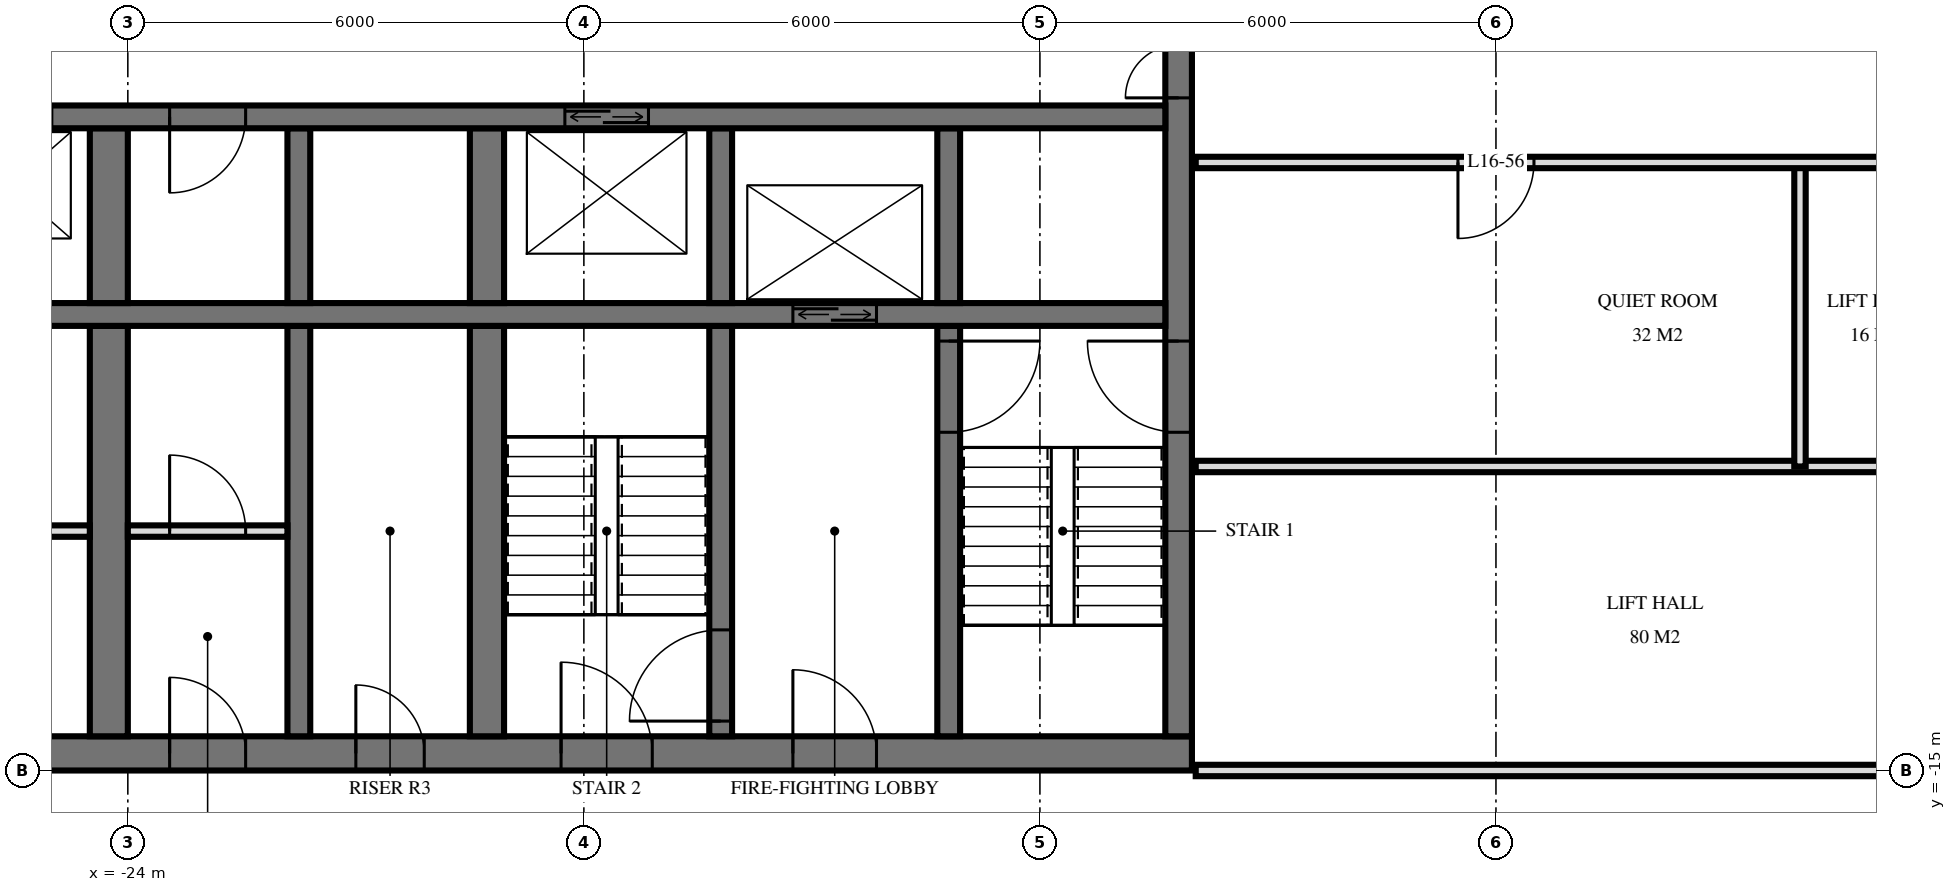
"""IFC4 building model, lengths in metres.
Left out: names, types, materials, properties, quantities, classifications, styles, units other than length and angle.
Written with IfcOpenShell. Run it as: python <this file> out.ifc"""

import sys

from ifc_helpers import new_model, si_unit, direction, frame, frame_2d, origin, place, context, subcontext, project, spatial, rectangle, extrude, element, fill, save


model = new_model("IFC4")
c1 = context("Model", 3, precision=1e-05, world=origin(), true_north=direction((0.0, 1.0)))
c2 = subcontext(c1, "Body", "Model", "MODEL_VIEW")
j1 = project(units=[si_unit("LENGTHUNIT", "METRE"), si_unit("PLANEANGLEUNIT", "RADIAN")], contexts=[c1])
p1 = place(None, origin())
s1 = spatial("IfcSite", under=j1, at=p1, CompositionType="ELEMENT")
p2 = place(p1, origin())
s2 = spatial("IfcBuilding", under=s1, at=p2, CompositionType="ELEMENT")
p3 = place(p2, frame((0.0, 0.0, 67.2)))
s3 = spatial("IfcBuildingStorey", under=s2, at=p3, CompositionType="ELEMENT", Elevation=67.2)
p4 = place(p3, frame((-29.5, -14.775, 0.0), z_axis=(0.0, 0.0, 1.0), x_axis=(1.0, 0.0, 0.0)))
e1 = element("IfcWall", 1, at=p4, inside=s3, PredefinedType="SHEAR", context=c2, shape_type="SweptSolid", body=[
    extrude(rectangle(XDim=19.5, YDim=0.45, at=frame_2d((9.75, 0.0))), origin(), (0.0, 0.0, 1.0), 3.6),
])
p5 = place(p4, frame((11.2, 0.0, 0.0)))
e2 = element("IfcOpeningElement", 2, at=p5, cuts=e1, PredefinedType="OPENING", context=c2, shape_type="SweptSolid", body=[
    extrude(rectangle(XDim=1.2, YDim=2.1, at=frame_2d((0.6, 1.05))), frame((0.0, 0.235, 0.0), z_axis=(0.0, -1.0, 0.0), x_axis=(1.0, 0.0, 0.0)), (0.0, 0.0, 1.0), 0.47),
])
p6 = place(p4, frame((14.25, 0.0, 0.0)))
e3 = element("IfcOpeningElement", 3, at=p6, cuts=e1, PredefinedType="OPENING", context=c2, shape_type="SweptSolid", body=[
    extrude(rectangle(XDim=1.1, YDim=2.1, at=frame_2d((0.55, 1.05))), frame((0.0, 0.235, 0.0), z_axis=(0.0, -1.0, 0.0), x_axis=(1.0, 0.0, 0.0)), (0.0, 0.0, 1.0), 0.47),
])
p7 = place(p4, frame((8.5, 0.0, 0.0)))
e4 = element("IfcOpeningElement", 4, at=p7, cuts=e1, PredefinedType="OPENING", context=c2, shape_type="SweptSolid", body=[
    extrude(rectangle(XDim=0.9, YDim=2.1, at=frame_2d((0.45, 1.05))), frame((0.0, 0.235, 0.0), z_axis=(0.0, -1.0, 0.0), x_axis=(1.0, 0.0, 0.0)), (0.0, 0.0, 1.0), 0.47),
])
p8 = place(p4, frame((6.05, 0.0, 0.0)))
e5 = element("IfcOpeningElement", 5, at=p8, cuts=e1, PredefinedType="OPENING", context=c2, shape_type="SweptSolid", body=[
    extrude(rectangle(XDim=1.0, YDim=2.1, at=frame_2d((0.5, 1.05))), frame((0.0, 0.235, 0.0), z_axis=(0.0, -1.0, 0.0), x_axis=(1.0, 0.0, 0.0)), (0.0, 0.0, 1.0), 0.47),
])
p9 = place(p4, frame((2.25, 0.0, 0.0)))
e6 = element("IfcOpeningElement", 6, at=p9, cuts=e1, PredefinedType="OPENING", context=c2, shape_type="SweptSolid", body=[
    extrude(rectangle(XDim=1.0, YDim=2.1, at=frame_2d((0.5, 1.05))), frame((0.0, 0.235, 0.0), z_axis=(0.0, -1.0, 0.0), x_axis=(1.0, 0.0, 0.0)), (0.0, 0.0, 1.0), 0.47),
])
p10 = place(p3, frame((-10.175, -14.55, 0.0), z_axis=(0.0, 0.0, 1.0), x_axis=(0.0, 1.0, 0.0)))
e7 = element("IfcWall", 7, at=p10, inside=s3, PredefinedType="SHEAR", context=c2, shape_type="SweptSolid", body=[
    extrude(rectangle(XDim=14.1, YDim=0.35, at=frame_2d((7.05, 0.0))), origin(), (0.0, 0.0, 1.0), 3.6),
])
p11 = place(p10, frame((8.4, 0.0, 0.0)))
e8 = element("IfcOpeningElement", 8, at=p11, cuts=e7, PredefinedType="OPENING", context=c2, shape_type="SweptSolid", body=[
    extrude(rectangle(XDim=1.4, YDim=2.4, at=frame_2d((0.7, 1.2))), frame((0.0, 0.185, 0.0), z_axis=(0.0, -1.0, 0.0), x_axis=(1.0, 0.0, 0.0)), (0.0, 0.0, 1.0), 0.37),
])
p12 = place(p10, frame((10.0, 0.0, 0.0)))
e9 = element("IfcOpeningElement", 9, at=p12, cuts=e7, PredefinedType="OPENING", context=c2, shape_type="SweptSolid", body=[
    extrude(rectangle(XDim=1.4, YDim=2.4, at=frame_2d((0.7, 1.2))), frame((0.0, 0.185, 0.0), z_axis=(0.0, -1.0, 0.0), x_axis=(1.0, 0.0, 0.0)), (0.0, 0.0, 1.0), 0.37),
])
p13 = place(p10, frame((4.0, 0.0, 0.0)))
e10 = element("IfcOpeningElement", 10, at=p13, cuts=e7, PredefinedType="OPENING", context=c2, shape_type="SweptSolid", body=[
    extrude(rectangle(XDim=1.2, YDim=2.1, at=frame_2d((0.6, 1.05))), frame((0.0, 0.185, 0.0), z_axis=(0.0, -1.0, 0.0), x_axis=(1.0, 0.0, 0.0)), (0.0, 0.0, 1.0), 0.37),
])
p14 = place(p3, frame((-29.05, -6.4, 0.0), z_axis=(0.0, 0.0, 1.0), x_axis=(1.0, 0.0, 0.0)))
e11 = element("IfcWall", 11, at=p14, inside=s3, PredefinedType="SHEAR", context=c2, shape_type="SweptSolid", body=[
    extrude(rectangle(XDim=18.7, YDim=0.3, at=frame_2d((9.35, 0.0))), origin(), (0.0, 0.0, 1.0), 3.6),
])
p15 = place(p14, frame((2.95, 0.0, 0.0)))
e12 = element("IfcOpeningElement", 12, at=p15, cuts=e11, PredefinedType="OPENING", context=c2, shape_type="SweptSolid", body=[
    extrude(rectangle(XDim=1.1, YDim=2.1, at=frame_2d((0.55, 1.05))), frame((0.0, 0.16, 0.0), z_axis=(0.0, -1.0, 0.0), x_axis=(1.0, 0.0, 0.0)), (0.0, 0.0, 1.0), 0.32),
])
p16 = place(p14, frame((0.55, 0.0, 0.0)))
e13 = element("IfcOpeningElement", 13, at=p16, cuts=e11, PredefinedType="OPENING", context=c2, shape_type="SweptSolid", body=[
    extrude(rectangle(XDim=1.1, YDim=2.1, at=frame_2d((0.55, 1.05))), frame((0.0, 0.16, 0.0), z_axis=(0.0, -1.0, 0.0), x_axis=(1.0, 0.0, 0.0)), (0.0, 0.0, 1.0), 0.32),
])
p17 = place(p14, frame((10.8, 0.0, 0.0)))
e14 = element("IfcOpeningElement", 14, at=p17, cuts=e11, PredefinedType="OPENING", context=c2, shape_type="SweptSolid", body=[
    extrude(rectangle(XDim=1.1, YDim=2.1, at=frame_2d((0.55, 1.05))), frame((0.0, 0.16, 0.0), z_axis=(0.0, -1.0, 0.0), x_axis=(1.0, 0.0, 0.0)), (0.0, 0.0, 1.0), 0.32),
])
p18 = place(p14, frame((5.6, 0.0, 0.0)))
e15 = element("IfcOpeningElement", 15, at=p18, cuts=e11, PredefinedType="OPENING", context=c2, shape_type="SweptSolid", body=[
    extrude(rectangle(XDim=1.0, YDim=2.1, at=frame_2d((0.5, 1.05))), frame((0.0, 0.16, 0.0), z_axis=(0.0, -1.0, 0.0), x_axis=(1.0, 0.0, 0.0)), (0.0, 0.0, 1.0), 0.32),
])
p19 = place(p3, frame((-29.05, -9.0, 0.0), z_axis=(0.0, 0.0, 1.0), x_axis=(1.0, 0.0, 0.0)))
e16 = element("IfcWall", 16, at=p19, inside=s3, PredefinedType="SHEAR", context=c2, shape_type="SweptSolid", body=[
    extrude(rectangle(XDim=18.7, YDim=0.3, at=frame_2d((9.35, 0.0))), origin(), (0.0, 0.0, 1.0), 3.6),
])
p20 = place(p19, frame((13.8, 0.0, 0.0)))
e17 = element("IfcOpeningElement", 17, at=p20, cuts=e16, PredefinedType="OPENING", context=c2, shape_type="SweptSolid", body=[
    extrude(rectangle(XDim=1.1, YDim=2.1, at=frame_2d((0.55, 1.05))), frame((0.0, 0.16, 0.0), z_axis=(0.0, -1.0, 0.0), x_axis=(1.0, 0.0, 0.0)), (0.0, 0.0, 1.0), 0.32),
])
p21 = place(p3, frame((-13.2, -8.85, 0.0), z_axis=(0.0, 0.0, 1.0), x_axis=(0.0, 1.0, 0.0)))
e18 = element("IfcWall", 18, at=p21, inside=s3, PredefinedType="SHEAR", context=c2, shape_type="SweptSolid", body=[
    extrude(rectangle(XDim=2.3, YDim=0.3, at=frame_2d((1.15, 0.0))), origin(), (0.0, 0.0, 1.0), 3.6),
])
p22 = place(p3, frame((-13.2, -14.55, 0.0), z_axis=(0.0, 0.0, 1.0), x_axis=(0.0, 1.0, 0.0)))
e19 = element("IfcWall", 19, at=p22, inside=s3, PredefinedType="SHEAR", context=c2, shape_type="SweptSolid", body=[
    extrude(rectangle(XDim=5.4, YDim=0.3, at=frame_2d((2.7, 0.0))), origin(), (0.0, 0.0, 1.0), 3.6),
])
p23 = place(p22, frame((4.0, 0.0, 0.0)))
e20 = element("IfcOpeningElement", 20, at=p23, cuts=e19, PredefinedType="OPENING", context=c2, shape_type="SweptSolid", body=[
    extrude(rectangle(XDim=1.2, YDim=2.1, at=frame_2d((0.6, 1.05))), frame((0.0, 0.16, 0.0), z_axis=(0.0, -1.0, 0.0), x_axis=(1.0, 0.0, 0.0)), (0.0, 0.0, 1.0), 0.32),
])
p24 = place(p3, frame((-16.2, -8.85, 0.0), z_axis=(0.0, 0.0, 1.0), x_axis=(0.0, 1.0, 0.0)))
e21 = element("IfcWall", 21, at=p24, inside=s3, PredefinedType="SHEAR", context=c2, shape_type="SweptSolid", body=[
    extrude(rectangle(XDim=2.3, YDim=0.3, at=frame_2d((1.15, 0.0))), origin(), (0.0, 0.0, 1.0), 3.6),
])
p25 = place(p3, frame((-16.2, -14.55, 0.0), z_axis=(0.0, 0.0, 1.0), x_axis=(0.0, 1.0, 0.0)))
e22 = element("IfcWall", 22, at=p25, inside=s3, PredefinedType="SHEAR", context=c2, shape_type="SweptSolid", body=[
    extrude(rectangle(XDim=5.4, YDim=0.3, at=frame_2d((2.7, 0.0))), origin(), (0.0, 0.0, 1.0), 3.6),
])
p26 = place(p25, frame((0.2, 0.0, 0.0)))
e23 = element("IfcOpeningElement", 23, at=p26, cuts=e22, PredefinedType="OPENING", context=c2, shape_type="SweptSolid", body=[
    extrude(rectangle(XDim=1.2, YDim=2.1, at=frame_2d((0.6, 1.05))), frame((0.0, 0.16, 0.0), z_axis=(0.0, -1.0, 0.0), x_axis=(1.0, 0.0, 0.0)), (0.0, 0.0, 1.0), 0.32),
])
p27 = place(p3, frame((-19.275, -8.85, 0.0), z_axis=(0.0, 0.0, 1.0), x_axis=(0.0, 1.0, 0.0)))
e24 = element("IfcWall", 24, at=p27, inside=s3, PredefinedType="SHEAR", context=c2, shape_type="SweptSolid", body=[
    extrude(rectangle(XDim=2.3, YDim=0.45, at=frame_2d((1.15, 0.0))), origin(), (0.0, 0.0, 1.0), 3.6),
])
p28 = place(p3, frame((-19.275, -14.55, 0.0), z_axis=(0.0, 0.0, 1.0), x_axis=(0.0, 1.0, 0.0)))
e25 = element("IfcWall", 25, at=p28, inside=s3, PredefinedType="SHEAR", context=c2, shape_type="SweptSolid", body=[
    extrude(rectangle(XDim=5.4, YDim=0.45, at=frame_2d((2.7, 0.0))), origin(), (0.0, 0.0, 1.0), 3.6),
])
p29 = place(p3, frame((-21.75, -8.85, 0.0), z_axis=(0.0, 0.0, 1.0), x_axis=(0.0, 1.0, 0.0)))
e26 = element("IfcWall", 26, at=p29, inside=s3, PredefinedType="SHEAR", context=c2, shape_type="SweptSolid", body=[
    extrude(rectangle(XDim=2.3, YDim=0.3, at=frame_2d((1.15, 0.0))), origin(), (0.0, 0.0, 1.0), 3.6),
])
p30 = place(p3, frame((-21.75, -14.55, 0.0), z_axis=(0.0, 0.0, 1.0), x_axis=(0.0, 1.0, 0.0)))
e27 = element("IfcWall", 27, at=p30, inside=s3, PredefinedType="SHEAR", context=c2, shape_type="SweptSolid", body=[
    extrude(rectangle(XDim=5.4, YDim=0.3, at=frame_2d((2.7, 0.0))), origin(), (0.0, 0.0, 1.0), 3.6),
])
p31 = place(p3, frame((-24.25, -8.85, 0.0), z_axis=(0.0, 0.0, 1.0), x_axis=(0.0, 1.0, 0.0)))
e28 = element("IfcWall", 28, at=p31, inside=s3, PredefinedType="SHEAR", context=c2, shape_type="SweptSolid", body=[
    extrude(rectangle(XDim=2.3, YDim=0.5, at=frame_2d((1.15, 0.0))), origin(), (0.0, 0.0, 1.0), 3.6),
])
p32 = place(p3, frame((-24.25, -14.55, 0.0), z_axis=(0.0, 0.0, 1.0), x_axis=(0.0, 1.0, 0.0)))
e29 = element("IfcWall", 29, at=p32, inside=s3, PredefinedType="SHEAR", context=c2, shape_type="SweptSolid", body=[
    extrude(rectangle(XDim=5.4, YDim=0.5, at=frame_2d((2.7, 0.0))), origin(), (0.0, 0.0, 1.0), 3.6),
])
p33 = place(p3, frame((-24.0, -11.85, 0.0), z_axis=(0.0, 0.0, 1.0), x_axis=(1.0, 0.0, 0.0)))
e30 = element("IfcWall", 30, at=p33, inside=s3, PredefinedType="PARTITIONING", context=c2, shape_type="SweptSolid", body=[
    extrude(rectangle(XDim=2.1, YDim=0.15, at=frame_2d((1.05, 0.0))), origin(), (0.0, 0.0, 1.0), 3.3),
])
p34 = place(p33, frame((0.55, 0.0, 0.0)))
e31 = element("IfcOpeningElement", 31, at=p34, cuts=e30, PredefinedType="OPENING", context=c2, shape_type="SweptSolid", body=[
    extrude(rectangle(XDim=1.0, YDim=2.1, at=frame_2d((0.5, 1.05))), frame((0.0, 0.085, 0.0), z_axis=(0.0, -1.0, 0.0), x_axis=(1.0, 0.0, 0.0)), (0.0, 0.0, 1.0), 0.17),
])
p35 = place(p3, frame((-29.0, -11.85, 0.0), z_axis=(0.0, 0.0, 1.0), x_axis=(1.0, 0.0, 0.0)))
e32 = element("IfcWall", 32, at=p35, inside=s3, PredefinedType="PARTITIONING", context=c2, shape_type="SweptSolid", body=[
    extrude(rectangle(XDim=4.5, YDim=0.15, at=frame_2d((2.25, 0.0))), origin(), (0.0, 0.0, 1.0), 3.3),
])
p36 = place(p35, frame((1.75, 0.0, 0.0)))
e33 = element("IfcOpeningElement", 33, at=p36, cuts=e32, PredefinedType="OPENING", context=c2, shape_type="SweptSolid", body=[
    extrude(rectangle(XDim=1.0, YDim=2.1, at=frame_2d((0.5, 1.05))), frame((0.0, 0.085, 0.0), z_axis=(0.0, -1.0, 0.0), x_axis=(1.0, 0.0, 0.0)), (0.0, 0.0, 1.0), 0.17),
])
p37 = place(p3, frame((-2.0, -11.0, 0.0), z_axis=(0.0, 0.0, 1.0), x_axis=(0.0, 1.0, 0.0)))
e34 = element("IfcWall", 34, at=p37, inside=s3, PredefinedType="PARTITIONING", context=c2, shape_type="SweptSolid", body=[
    extrude(rectangle(XDim=4.0, YDim=0.15, at=frame_2d((2.0, 0.0))), origin(), (0.0, 0.0, 1.0), 3.32),
])
p38 = place(p3, frame((-9.95, -15.0, 0.0), z_axis=(0.0, 0.0, 1.0), x_axis=(1.0, 0.0, 0.0)))
e35 = element("IfcWall", 35, at=p38, inside=s3, PredefinedType="PARTITIONING", context=c2, shape_type="SweptSolid", body=[
    extrude(rectangle(XDim=19.9, YDim=0.15, at=frame_2d((9.95, 0.0))), origin(), (0.0, 0.0, 1.0), 2.684),
])
p39 = place(p38, frame((9.45, 0.0, 0.0)))
e36 = element("IfcOpeningElement", 36, at=p39, cuts=e35, PredefinedType="OPENING", context=c2, shape_type="SweptSolid", body=[
    extrude(rectangle(XDim=1.0, YDim=2.1, at=frame_2d((0.5, 1.05))), frame((0.0, 0.085, 0.0), z_axis=(0.0, -1.0, 0.0), x_axis=(1.0, 0.0, 0.0)), (0.0, 0.0, 1.0), 0.17),
])
p40 = place(p3, frame((-9.95, -11.0, 0.0), z_axis=(0.0, 0.0, 1.0), x_axis=(1.0, 0.0, 0.0)))
e37 = element("IfcWall", 37, at=p40, inside=s3, PredefinedType="PARTITIONING", context=c2, shape_type="SweptSolid", body=[
    extrude(rectangle(XDim=19.9, YDim=0.15, at=frame_2d((9.95, 0.0))), origin(), (0.0, 0.0, 1.0), 3.32),
])
p41 = place(p40, frame((9.45, 0.0, 0.0)))
e38 = element("IfcOpeningElement", 38, at=p41, cuts=e37, PredefinedType="OPENING", context=c2, shape_type="SweptSolid", body=[
    extrude(rectangle(XDim=1.0, YDim=2.1, at=frame_2d((0.5, 1.05))), frame((0.0, 0.085, 0.0), z_axis=(0.0, -1.0, 0.0), x_axis=(1.0, 0.0, 0.0)), (0.0, 0.0, 1.0), 0.17),
])
p42 = place(p40, frame((15.45, 0.0, 0.0)))
e39 = element("IfcOpeningElement", 39, at=p42, cuts=e37, PredefinedType="OPENING", context=c2, shape_type="SweptSolid", body=[
    extrude(rectangle(XDim=1.0, YDim=2.1, at=frame_2d((0.5, 1.05))), frame((0.0, 0.085, 0.0), z_axis=(0.0, -1.0, 0.0), x_axis=(1.0, 0.0, 0.0)), (0.0, 0.0, 1.0), 0.17),
])
p43 = place(p3, frame((-9.95, -7.0, 0.0), z_axis=(0.0, 0.0, 1.0), x_axis=(1.0, 0.0, 0.0)))
e40 = element("IfcWall", 40, at=p43, inside=s3, PredefinedType="PARTITIONING", context=c2, shape_type="SweptSolid", body=[
    extrude(rectangle(XDim=19.9, YDim=0.15, at=frame_2d((9.95, 0.0))), origin(), (0.0, 0.0, 1.0), 3.32),
])
p44 = place(p43, frame((9.45, 0.0, 0.0)))
e41 = element("IfcOpeningElement", 41, at=p44, cuts=e40, PredefinedType="OPENING", context=c2, shape_type="SweptSolid", body=[
    extrude(rectangle(XDim=1.0, YDim=2.1, at=frame_2d((0.5, 1.05))), frame((0.0, 0.085, 0.0), z_axis=(0.0, -1.0, 0.0), x_axis=(1.0, 0.0, 0.0)), (0.0, 0.0, 1.0), 0.17),
])
p45 = place(p43, frame((3.45, 0.0, 0.0)))
e42 = element("IfcOpeningElement", 42, at=p45, cuts=e40, PredefinedType="OPENING", context=c2, shape_type="SweptSolid", body=[
    extrude(rectangle(XDim=1.0, YDim=2.1, at=frame_2d((0.5, 1.05))), frame((0.0, 0.085, 0.0), z_axis=(0.0, -1.0, 0.0), x_axis=(1.0, 0.0, 0.0)), (0.0, 0.0, 1.0), 0.17),
])
p46 = place(p20, origin())
e43 = element("IfcDoor", 43, at=p46, inside=s3, OperationType="DOUBLE_DOOR_SLIDING", PredefinedType="USERDEFINED", context=c2, shape_type="SweptSolid", body=[
    extrude(rectangle(XDim=1.1, YDim=2.1, at=frame_2d((0.55, 1.05))), frame((0.0, 0.025, 0.0), z_axis=(0.0, -1.0, 0.0), x_axis=(1.0, 0.0, 0.0)), (0.0, 0.0, 1.0), 0.05),
])
fill(e17, e43)
p47 = place(p17, origin())
e44 = element("IfcDoor", 44, at=p47, inside=s3, OperationType="DOUBLE_DOOR_SLIDING", PredefinedType="USERDEFINED", context=c2, shape_type="SweptSolid", body=[
    extrude(rectangle(XDim=1.1, YDim=2.1, at=frame_2d((0.55, 1.05))), frame((0.0, 0.025, 0.0), z_axis=(0.0, -1.0, 0.0), x_axis=(1.0, 0.0, 0.0)), (0.0, 0.0, 1.0), 0.05),
])
fill(e14, e44)
p48 = place(p11, origin())
e45 = element("IfcDoor", 45, at=p48, inside=s3, OperationType="DOUBLE_DOOR_SINGLE_SWING", PredefinedType="DOOR", context=c2, shape_type="SweptSolid", body=[
    extrude(rectangle(XDim=1.4, YDim=2.4, at=frame_2d((0.7, 1.2))), frame((0.0, 0.025, 0.0), z_axis=(0.0, -1.0, 0.0), x_axis=(1.0, 0.0, 0.0)), (0.0, 0.0, 1.0), 0.05),
])
fill(e8, e45)
p49 = place(p13, origin())
e46 = element("IfcDoor", 46, at=p49, inside=s3, OperationType="SINGLE_SWING_LEFT", PredefinedType="DOOR", context=c2, shape_type="SweptSolid", body=[
    extrude(rectangle(XDim=1.2, YDim=2.1, at=frame_2d((0.6, 1.05))), frame((0.0, 0.025, 0.0), z_axis=(0.0, -1.0, 0.0), x_axis=(1.0, 0.0, 0.0)), (0.0, 0.0, 1.0), 0.05),
])
fill(e10, e46)
p50 = place(p5, origin())
e47 = element("IfcDoor", 47, at=p50, inside=s3, OperationType="SINGLE_SWING_RIGHT", PredefinedType="DOOR", context=c2, shape_type="SweptSolid", body=[
    extrude(rectangle(XDim=1.2, YDim=2.1, at=frame_2d((0.6, 1.05))), frame((0.0, 0.025, 0.0), z_axis=(0.0, -1.0, 0.0), x_axis=(1.0, 0.0, 0.0)), (0.0, 0.0, 1.0), 0.05),
])
fill(e2, e47)
p51 = place(p6, origin())
e48 = element("IfcDoor", 48, at=p51, inside=s3, OperationType="SINGLE_SWING_RIGHT", PredefinedType="DOOR", context=c2, shape_type="SweptSolid", body=[
    extrude(rectangle(XDim=1.1, YDim=2.1, at=frame_2d((0.55, 1.05))), frame((0.0, 0.025, 0.0), z_axis=(0.0, -1.0, 0.0), x_axis=(1.0, 0.0, 0.0)), (0.0, 0.0, 1.0), 0.05),
])
fill(e3, e48)
p52 = place(p7, origin())
e49 = element("IfcDoor", 49, at=p52, inside=s3, OperationType="SINGLE_SWING_RIGHT", PredefinedType="DOOR", context=c2, shape_type="SweptSolid", body=[
    extrude(rectangle(XDim=0.9, YDim=2.1, at=frame_2d((0.45, 1.05))), frame((0.0, 0.025, 0.0), z_axis=(0.0, -1.0, 0.0), x_axis=(1.0, 0.0, 0.0)), (0.0, 0.0, 1.0), 0.05),
])
fill(e4, e49)
p53 = place(p8, origin())
e50 = element("IfcDoor", 50, at=p53, inside=s3, OperationType="SINGLE_SWING_RIGHT", PredefinedType="DOOR", context=c2, shape_type="SweptSolid", body=[
    extrude(rectangle(XDim=1.0, YDim=2.1, at=frame_2d((0.5, 1.05))), frame((0.0, 0.025, 0.0), z_axis=(0.0, -1.0, 0.0), x_axis=(1.0, 0.0, 0.0)), (0.0, 0.0, 1.0), 0.05),
])
fill(e5, e50)
p54 = place(p18, frame((0.5, 0.0, 0.0), z_axis=(0.0, 0.0, 1.0), x_axis=(-1.0, 0.0, 0.0)))
e51 = element("IfcDoor", 51, at=p54, inside=s3, OperationType="SINGLE_SWING_LEFT", PredefinedType="DOOR", context=c2, shape_type="SweptSolid", body=[
    extrude(rectangle(XDim=1.0, YDim=2.1, at=frame_2d((0.0, 1.05))), frame((0.0, -0.025, 0.0), z_axis=(0.0, 1.0, 0.0), x_axis=(-1.0, 0.0, 0.0)), (0.0, 0.0, 1.0), 0.05),
])
fill(e15, e51)
p55 = place(p23, frame((0.6, 0.0, 0.0), z_axis=(0.0, 0.0, 1.0), x_axis=(-1.0, 0.0, 0.0)))
e52 = element("IfcDoor", 52, at=p55, inside=s3, OperationType="SINGLE_SWING_RIGHT", PredefinedType="DOOR", context=c2, shape_type="SweptSolid", body=[
    extrude(rectangle(XDim=1.2, YDim=2.1, at=frame_2d((0.0, 1.05))), frame((0.0, -0.025, 0.0), z_axis=(0.0, 1.0, 0.0), x_axis=(-1.0, 0.0, 0.0)), (0.0, 0.0, 1.0), 0.05),
])
fill(e20, e52)
p56 = place(p26, origin())
e53 = element("IfcDoor", 53, at=p56, inside=s3, OperationType="SINGLE_SWING_RIGHT", PredefinedType="DOOR", context=c2, shape_type="SweptSolid", body=[
    extrude(rectangle(XDim=1.2, YDim=2.1, at=frame_2d((0.6, 1.05))), frame((0.0, 0.025, 0.0), z_axis=(0.0, -1.0, 0.0), x_axis=(1.0, 0.0, 0.0)), (0.0, 0.0, 1.0), 0.05),
])
fill(e23, e53)
p57 = place(p34, origin())
e54 = element("IfcDoor", 54, at=p57, inside=s3, OperationType="SINGLE_SWING_RIGHT", PredefinedType="DOOR", context=c2, shape_type="SweptSolid", body=[
    extrude(rectangle(XDim=1.0, YDim=2.1, at=frame_2d((0.5, 1.05))), frame((0.0, 0.025, 0.0), z_axis=(0.0, -1.0, 0.0), x_axis=(1.0, 0.0, 0.0)), (0.0, 0.0, 1.0), 0.05),
])
fill(e31, e54)
p58 = place(p45, frame((0.5, 0.0, 0.0), z_axis=(0.0, 0.0, 1.0), x_axis=(-1.0, 0.0, 0.0)))
e55 = element("IfcDoor", 55, at=p58, inside=s3, OperationType="SINGLE_SWING_LEFT", PredefinedType="DOOR", context=c2, shape_type="SweptSolid", body=[
    extrude(rectangle(XDim=1.0, YDim=2.1, at=frame_2d((0.0, 1.05))), frame((0.0, -0.025, 0.0), z_axis=(0.0, 1.0, 0.0), x_axis=(-1.0, 0.0, 0.0)), (0.0, 0.0, 1.0), 0.05),
])
fill(e42, e55)
save(model, sys.argv[1])
